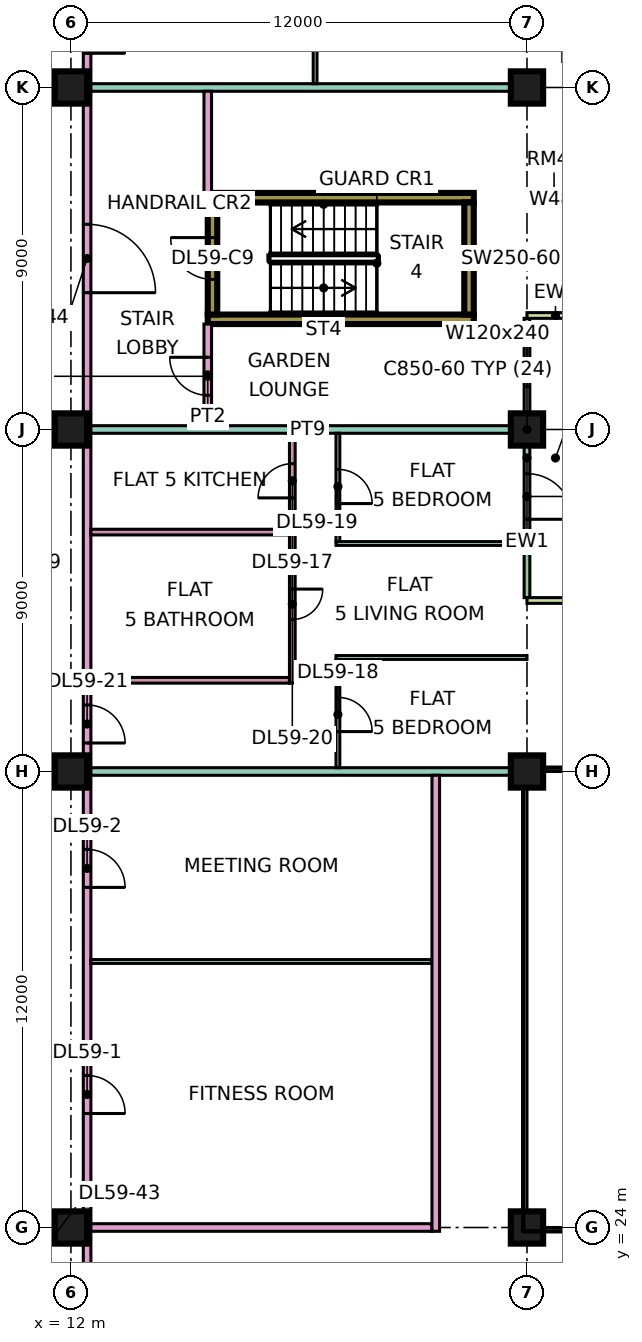
"""IFC4 building model, lengths in metres.
Left out: names, types, materials, properties, quantities, classifications, styles, units other than length and angle.
Written with IfcOpenShell. Run it as: python <this file> out.ifc"""

import sys

from ifc_helpers import new_model, si_unit, direction, frame, frame_2d, origin, origin_2d, place, context, subcontext, project, spatial, rectangle, extrude, element, fill, save


model = new_model("IFC4")
c1 = context("Model", 3, precision=1e-05, world=origin(), true_north=direction((0.0, 1.0)))
c2 = subcontext(c1, "Body", "Model", "MODEL_VIEW")
j1 = project(units=[si_unit("LENGTHUNIT", "METRE"), si_unit("PLANEANGLEUNIT", "RADIAN")], contexts=[c1])
p1 = place(None, origin())
s1 = spatial("IfcSite", under=j1, at=p1, CompositionType="ELEMENT")
p2 = place(p1, origin())
s2 = spatial("IfcBuilding", under=s1, at=p2, CompositionType="ELEMENT")
p3 = place(p2, frame((0.0, 0.0, 249.15)))
s3 = spatial("IfcBuildingStorey", under=s2, at=p3, CompositionType="ELEMENT", Elevation=249.15)
for number, where, z_axis, x_axis in (
    (1, (12.0, 24.0, 0.0), (0.0, 0.0, 1.0), (1.0, 0.0, 0.0)),
    (2, (12.0, 36.0, 0.0), (0.0, 0.0, 1.0), (1.0, 0.0, 0.0)),
    (3, (12.0, 45.0, 0.0), (0.0, 0.0, 1.0), (1.0, 0.0, 0.0)),
    (4, (12.0, 54.0, 0.0), (0.0, 0.0, 1.0), (1.0, 0.0, 0.0)),
    (5, (24.0, 24.0, 0.0), (0.0, 0.0, 1.0), (1.0, 0.0, 0.0)),
    (6, (24.0, 36.0, 0.0), (0.0, 0.0, 1.0), (1.0, 0.0, 0.0)),
    (7, (24.0, 45.0, 0.0), (0.0, 0.0, 1.0), (1.0, 0.0, 0.0)),
    (8, (24.0, 54.0, 0.0), (0.0, 0.0, 1.0), (1.0, 0.0, 0.0)),
):
    element("IfcColumn", number, at=place(p3, frame(where, z_axis=z_axis, x_axis=x_axis)), inside=s3, PredefinedType="COLUMN", context=c2, shape_type="SweptSolid", body=[
        extrude(rectangle(XDim=0.85, YDim=0.85, at=origin_2d()), origin(), (0.0, 0.0, 1.0), 3.75),
    ])
for number, where, z_axis, x_axis in (
    (9, (15.6, 47.9, 0.0), (0.0, 0.0, 1.0), (1.0, 0.0, 0.0)),
    (10, (15.6, 51.1, 0.0), (0.0, 0.0, 1.0), (1.0, 0.0, 0.0)),
):
    element("IfcWall", number, at=place(p3, frame(where, z_axis=z_axis, x_axis=x_axis)), inside=s3, PredefinedType="SHEAR", context=c2, shape_type="SweptSolid", body=[
        extrude(rectangle(XDim=7.0, YDim=0.25, at=frame_2d((3.5, 0.0))), origin(), (0.0, 0.0, 1.0), 3.75),
    ])
p4 = place(p3, frame((15.725, 48.025, 0.0), z_axis=(0.0, 0.0, 1.0), x_axis=(0.0, 1.0, 0.0)))
e11 = element("IfcWall", 11, at=p4, inside=s3, PredefinedType="SHEAR", context=c2, shape_type="SweptSolid", body=[
    extrude(rectangle(XDim=2.95, YDim=0.25, at=frame_2d((1.475, 0.0))), origin(), (0.0, 0.0, 1.0), 3.75),
])
p5 = place(p4, frame((0.925, 0.0, 0.0)))
e12 = element("IfcOpeningElement", 12, at=p5, cuts=e11, PredefinedType="OPENING", context=c2, shape_type="SweptSolid", body=[
    extrude(rectangle(XDim=1.1, YDim=2.2, at=frame_2d((0.55, 1.1))), frame((0.0, 0.135, 0.0), z_axis=(0.0, -1.0, 0.0), x_axis=(1.0, 0.0, 0.0)), (0.0, 0.0, 1.0), 0.27),
])
p6 = place(p3, frame((22.475, 48.025, 0.0), z_axis=(0.0, 0.0, 1.0), x_axis=(0.0, 1.0, 0.0)))
e13 = element("IfcWall", 13, at=p6, inside=s3, PredefinedType="SHEAR", context=c2, shape_type="SweptSolid", body=[
    extrude(rectangle(XDim=2.95, YDim=0.25, at=frame_2d((1.475, 0.0))), origin(), (0.0, 0.0, 1.0), 3.75),
])
p7 = place(p3, frame((24.0, 40.575, 0.0), z_axis=(0.0, 0.0, 1.0), x_axis=(0.0, 1.0, 0.0)))
e14 = element("IfcWall", 14, at=p7, inside=s3, PredefinedType="SOLIDWALL", context=c2, shape_type="SweptSolid", body=[
    extrude(rectangle(XDim=7.35, YDim=0.15, at=frame_2d((3.675, 0.0))), origin(), (0.0, 0.0, 1.0), 3.35),
])
p8 = place(p7, frame((2.062, 0.0, 0.0)))
e15 = element("IfcOpeningElement", 15, at=p8, cuts=e14, PredefinedType="OPENING", context=c2, shape_type="SweptSolid", body=[
    extrude(rectangle(XDim=1.2, YDim=2.4, at=frame_2d((0.6, 1.2))), frame((0.0, 0.085, 0.0), z_axis=(0.0, -1.0, 0.0), x_axis=(1.0, 0.0, 0.0)), (0.0, 0.0, 1.0), 0.17),
])
p9 = place(p7, frame((5.55, 0.0, 0.45)))
e16 = element("IfcOpeningElement", 16, at=p9, cuts=e14, PredefinedType="OPENING", context=c2, shape_type="SweptSolid", body=[
    extrude(rectangle(XDim=1.2, YDim=2.4, at=frame_2d((0.6, 1.2))), frame((0.0, 0.085, 0.0), z_axis=(0.0, -1.0, 0.0), x_axis=(1.0, 0.0, 0.0)), (0.0, 0.0, 1.0), 0.17),
])
for number, where, z_axis, x_axis in (
    (17, (25.5, 40.5, 0.0), (0.0, 0.0, 1.0), (-1.0, 0.0, 0.0)),
    (18, (25.5, 48.0, 0.0), (0.0, 0.0, 1.0), (-1.0, 0.0, 0.0)),
):
    element("IfcWall", number, at=place(p3, frame(where, z_axis=z_axis, x_axis=x_axis)), inside=s3, PredefinedType="SOLIDWALL", context=c2, shape_type="SweptSolid", body=[
        extrude(rectangle(XDim=1.5, YDim=0.15, at=frame_2d((0.75, 0.0))), origin(), (0.0, 0.0, 1.0), 3.35),
    ])
p10 = place(p3, frame((12.425, 20.0, 0.0), z_axis=(0.0, 0.0, 1.0), x_axis=(0.0, 1.0, 0.0)))
e19 = element("IfcWall", 19, at=p10, inside=s3, PredefinedType="PARTITIONING", context=c2, shape_type="SweptSolid", body=[
    extrude(rectangle(XDim=42.926, YDim=0.2, at=frame_2d((21.463, 0.0))), origin(), (0.0, 0.0, 1.0), 3.35),
])
p11 = place(p10, frame((7.0, 0.0, 0.0)))
e20 = element("IfcOpeningElement", 20, at=p11, cuts=e19, PredefinedType="OPENING", context=c2, shape_type="SweptSolid", body=[
    extrude(rectangle(XDim=1.0, YDim=2.1, at=frame_2d((0.5, 1.05))), frame((0.0, 0.11, 0.0), z_axis=(0.0, -1.0, 0.0), x_axis=(1.0, 0.0, 0.0)), (0.0, 0.0, 1.0), 0.22),
])
p12 = place(p10, frame((12.95, 0.0, 0.0)))
e21 = element("IfcOpeningElement", 21, at=p12, cuts=e19, PredefinedType="OPENING", context=c2, shape_type="SweptSolid", body=[
    extrude(rectangle(XDim=1.0, YDim=2.1, at=frame_2d((0.5, 1.05))), frame((0.0, 0.11, 0.0), z_axis=(0.0, -1.0, 0.0), x_axis=(1.0, 0.0, 0.0)), (0.0, 0.0, 1.0), 0.22),
])
p13 = place(p10, frame((16.75, 0.0, 0.0)))
e22 = element("IfcOpeningElement", 22, at=p13, cuts=e19, PredefinedType="OPENING", context=c2, shape_type="SweptSolid", body=[
    extrude(rectangle(XDim=1.0, YDim=2.1, at=frame_2d((0.5, 1.05))), frame((0.0, 0.11, 0.0), z_axis=(0.0, -1.0, 0.0), x_axis=(1.0, 0.0, 0.0)), (0.0, 0.0, 1.0), 0.22),
])
p14 = place(p10, frame((34.9, 0.0, 0.0)))
e23 = element("IfcOpeningElement", 23, at=p14, cuts=e19, PredefinedType="OPENING", context=c2, shape_type="SweptSolid", body=[
    extrude(rectangle(XDim=1.0, YDim=2.1, at=frame_2d((0.5, 1.05))), frame((0.0, 0.11, 0.0), z_axis=(0.0, -1.0, 0.0), x_axis=(1.0, 0.0, 0.0)), (0.0, 0.0, 1.0), 0.22),
])
p15 = place(p10, frame((1.15, 0.0, 0.0)))
e24 = element("IfcOpeningElement", 24, at=p15, cuts=e19, PredefinedType="OPENING", context=c2, shape_type="SweptSolid", body=[
    extrude(rectangle(XDim=1.8, YDim=2.1, at=frame_2d((0.9, 1.05))), frame((0.0, 0.11, 0.0), z_axis=(0.0, -1.0, 0.0), x_axis=(1.0, 0.0, 0.0)), (0.0, 0.0, 1.0), 0.22),
])
p16 = place(p10, frame((28.6, 0.0, 0.0)))
e25 = element("IfcOpeningElement", 25, at=p16, cuts=e19, PredefinedType="OPENING", context=c2, shape_type="SweptSolid", body=[
    extrude(rectangle(XDim=1.8, YDim=2.1, at=frame_2d((0.9, 1.05))), frame((0.0, 0.11, 0.0), z_axis=(0.0, -1.0, 0.0), x_axis=(1.0, 0.0, 0.0)), (0.0, 0.0, 1.0), 0.22),
])
p17 = place(p3, frame((12.525, 24.0, 0.0), z_axis=(0.0, 0.0, 1.0), x_axis=(1.0, 0.0, 0.0)))
e26 = element("IfcWall", 26, at=p17, inside=s3, PredefinedType="PARTITIONING", context=c2, shape_type="SweptSolid", body=[
    extrude(rectangle(XDim=8.975, YDim=0.2, at=frame_2d((4.488, 0.0))), origin(), (0.0, 0.0, 1.0), 3.35),
])
p18 = place(p3, frame((12.525, 31.0, 0.0), z_axis=(0.0, 0.0, 1.0), x_axis=(1.0, 0.0, 0.0)))
e27 = element("IfcWall", 27, at=p18, inside=s3, PredefinedType="PARTITIONING", context=c2, shape_type="SweptSolid", body=[
    extrude(rectangle(XDim=8.975, YDim=0.1, at=frame_2d((4.488, 0.0))), origin(), (0.0, 0.0, 1.0), 3.35),
])
p19 = place(p3, frame((12.525, 36.0, 0.0), z_axis=(0.0, 0.0, 1.0), x_axis=(1.0, 0.0, 0.0)))
e28 = element("IfcWall", 28, at=p19, inside=s3, PredefinedType="PARTITIONING", context=c2, shape_type="SweptSolid", body=[
    extrude(rectangle(XDim=11.475, YDim=0.2, at=frame_2d((5.738, 0.0))), origin(), (0.0, 0.0, 1.0), 3.35),
])
for number, where, z_axis, x_axis in (
    (29, (12.525, 38.4, 0.0), (0.0, 0.0, 1.0), (1.0, 0.0, 0.0)),
    (30, (12.525, 42.3, 0.0), (0.0, 0.0, 1.0), (1.0, 0.0, 0.0)),
):
    element("IfcWall", number, at=place(p3, frame(where, z_axis=z_axis, x_axis=x_axis)), inside=s3, PredefinedType="PARTITIONING", context=c2, shape_type="SweptSolid", body=[
        extrude(rectangle(XDim=5.225, YDim=0.15, at=frame_2d((2.613, 0.0))), origin(), (0.0, 0.0, 1.0), 3.35),
    ])
p20 = place(p3, frame((12.525, 45.0, 0.0), z_axis=(0.0, 0.0, 1.0), x_axis=(1.0, 0.0, 0.0)))
e31 = element("IfcWall", 31, at=p20, inside=s3, PredefinedType="PARTITIONING", context=c2, shape_type="SweptSolid", body=[
    extrude(rectangle(XDim=11.401, YDim=0.2, at=frame_2d((5.701, 0.0))), origin(), (0.0, 0.0, 1.0), 3.35),
])
p21 = place(p3, frame((12.525, 54.0, 0.0), z_axis=(0.0, 0.0, 1.0), x_axis=(1.0, 0.0, 0.0)))
e32 = element("IfcWall", 32, at=p21, inside=s3, PredefinedType="PARTITIONING", context=c2, shape_type="SweptSolid", body=[
    extrude(rectangle(XDim=11.475, YDim=0.2, at=frame_2d((5.738, 0.0))), origin(), (0.0, 0.0, 1.0), 3.35),
])
p22 = place(p3, frame((15.6, 45.1, 0.0), z_axis=(0.0, 0.0, 1.0), x_axis=(0.0, 1.0, 0.0)))
e33 = element("IfcWall", 33, at=p22, inside=s3, PredefinedType="PARTITIONING", context=c2, shape_type="SweptSolid", body=[
    extrude(rectangle(XDim=2.675, YDim=0.2, at=frame_2d((1.337, 0.0))), origin(), (0.0, 0.0, 1.0), 3.35),
])
p23 = place(p22, frame((0.8, 0.0, 0.0)))
e34 = element("IfcOpeningElement", 34, at=p23, cuts=e33, PredefinedType="OPENING", context=c2, shape_type="SweptSolid", body=[
    extrude(rectangle(XDim=1.0, YDim=2.1, at=frame_2d((0.5, 1.05))), frame((0.0, 0.11, 0.0), z_axis=(0.0, -1.0, 0.0), x_axis=(1.0, 0.0, 0.0)), (0.0, 0.0, 1.0), 0.22),
])
p24 = place(p3, frame((15.6, 51.225, 0.0), z_axis=(0.0, 0.0, 1.0), x_axis=(0.0, 1.0, 0.0)))
e35 = element("IfcWall", 35, at=p24, inside=s3, PredefinedType="PARTITIONING", context=c2, shape_type="SweptSolid", body=[
    extrude(rectangle(XDim=2.675, YDim=0.2, at=frame_2d((1.337, 0.0))), origin(), (0.0, 0.0, 1.0), 3.35),
])
p25 = place(p3, frame((17.825, 38.325, 0.0), z_axis=(0.0, 0.0, 1.0), x_axis=(0.0, 1.0, 0.0)))
e36 = element("IfcWall", 36, at=p25, inside=s3, PredefinedType="PARTITIONING", context=c2, shape_type="SweptSolid", body=[
    extrude(rectangle(XDim=6.575, YDim=0.15, at=frame_2d((3.288, 0.0))), origin(), (0.0, 0.0, 1.0), 3.35),
])
p26 = place(p25, frame((1.675, 0.0, 0.0)))
e37 = element("IfcOpeningElement", 37, at=p26, cuts=e36, PredefinedType="OPENING", context=c2, shape_type="SweptSolid", body=[
    extrude(rectangle(XDim=0.8, YDim=2.1, at=frame_2d((0.4, 1.05))), frame((0.0, 0.085, 0.0), z_axis=(0.0, -1.0, 0.0), x_axis=(1.0, 0.0, 0.0)), (0.0, 0.0, 1.0), 0.17),
])
p27 = place(p25, frame((4.875, 0.0, 0.0)))
e38 = element("IfcOpeningElement", 38, at=p27, cuts=e36, PredefinedType="OPENING", context=c2, shape_type="SweptSolid", body=[
    extrude(rectangle(XDim=0.9, YDim=2.1, at=frame_2d((0.45, 1.05))), frame((0.0, 0.085, 0.0), z_axis=(0.0, -1.0, 0.0), x_axis=(1.0, 0.0, 0.0)), (0.0, 0.0, 1.0), 0.17),
])
p28 = place(p3, frame((18.425, 54.1, 0.0), z_axis=(0.0, 0.0, 1.0), x_axis=(0.0, 1.0, 0.0)))
e39 = element("IfcWall", 39, at=p28, inside=s3, PredefinedType="PARTITIONING", context=c2, shape_type="SweptSolid", body=[
    extrude(rectangle(XDim=2.85, YDim=0.1, at=frame_2d((1.425, 0.0))), origin(), (0.0, 0.0, 1.0), 3.35),
])
p29 = place(p28, frame((0.95, 0.0, 0.0)))
e40 = element("IfcOpeningElement", 40, at=p29, cuts=e39, PredefinedType="OPENING", context=c2, shape_type="SweptSolid", body=[
    extrude(rectangle(XDim=0.9, YDim=2.1, at=frame_2d((0.45, 1.05))), frame((0.0, 0.06, 0.0), z_axis=(0.0, -1.0, 0.0), x_axis=(1.0, 0.0, 0.0)), (0.0, 0.0, 1.0), 0.12),
])
p30 = place(p3, frame((18.975, 39.0, 0.0), z_axis=(0.0, 0.0, 1.0), x_axis=(1.0, 0.0, 0.0)))
e41 = element("IfcWall", 41, at=p30, inside=s3, PredefinedType="PARTITIONING", context=c2, shape_type="SweptSolid", body=[
    extrude(rectangle(XDim=5.025, YDim=0.1, at=frame_2d((2.512, 0.0))), origin(), (0.0, 0.0, 1.0), 3.35),
])
p31 = place(p3, frame((18.975, 42.0, 0.0), z_axis=(0.0, 0.0, 1.0), x_axis=(1.0, 0.0, 0.0)))
e42 = element("IfcWall", 42, at=p31, inside=s3, PredefinedType="PARTITIONING", context=c2, shape_type="SweptSolid", body=[
    extrude(rectangle(XDim=4.951, YDim=0.1, at=frame_2d((2.476, 0.0))), origin(), (0.0, 0.0, 1.0), 3.35),
])
p32 = place(p3, frame((19.025, 36.1, 0.0), z_axis=(0.0, 0.0, 1.0), x_axis=(0.0, 1.0, 0.0)))
e43 = element("IfcWall", 43, at=p32, inside=s3, PredefinedType="PARTITIONING", context=c2, shape_type="SweptSolid", body=[
    extrude(rectangle(XDim=2.85, YDim=0.1, at=frame_2d((1.425, 0.0))), origin(), (0.0, 0.0, 1.0), 3.35),
])
p33 = place(p32, frame((0.95, 0.0, 0.0)))
e44 = element("IfcOpeningElement", 44, at=p33, cuts=e43, PredefinedType="OPENING", context=c2, shape_type="SweptSolid", body=[
    extrude(rectangle(XDim=0.9, YDim=2.1, at=frame_2d((0.45, 1.05))), frame((0.0, 0.06, 0.0), z_axis=(0.0, -1.0, 0.0), x_axis=(1.0, 0.0, 0.0)), (0.0, 0.0, 1.0), 0.12),
])
p34 = place(p3, frame((19.025, 42.05, 0.0), z_axis=(0.0, 0.0, 1.0), x_axis=(0.0, 1.0, 0.0)))
e45 = element("IfcWall", 45, at=p34, inside=s3, PredefinedType="PARTITIONING", context=c2, shape_type="SweptSolid", body=[
    extrude(rectangle(XDim=2.85, YDim=0.1, at=frame_2d((1.425, 0.0))), origin(), (0.0, 0.0, 1.0), 3.35),
])
p35 = place(p34, frame((1.0, 0.0, 0.0)))
e46 = element("IfcOpeningElement", 46, at=p35, cuts=e45, PredefinedType="OPENING", context=c2, shape_type="SweptSolid", body=[
    extrude(rectangle(XDim=0.9, YDim=2.1, at=frame_2d((0.45, 1.05))), frame((0.0, 0.06, 0.0), z_axis=(0.0, -1.0, 0.0), x_axis=(1.0, 0.0, 0.0)), (0.0, 0.0, 1.0), 0.12),
])
p36 = place(p3, frame((21.6, 23.9, 0.0), z_axis=(0.0, 0.0, 1.0), x_axis=(0.0, 1.0, 0.0)))
e47 = element("IfcWall", 47, at=p36, inside=s3, PredefinedType="PARTITIONING", context=c2, shape_type="SweptSolid", body=[
    extrude(rectangle(XDim=12.0, YDim=0.2, at=frame_2d((6.0, 0.0))), origin(), (0.0, 0.0, 1.0), 3.35),
])
p37 = place(p8, frame((1.2, 0.0, 0.0), z_axis=(0.0, 0.0, 1.0), x_axis=(-1.0, 0.0, 0.0)))
e48 = element("IfcDoor", 48, at=p37, inside=s3, OperationType="DOUBLE_DOOR_SINGLE_SWING", PredefinedType="DOOR", context=c2, shape_type="SweptSolid", body=[
    extrude(rectangle(XDim=1.2, YDim=2.4, at=frame_2d((0.6, 1.2))), frame((0.0, 0.025, 0.0), z_axis=(0.0, -1.0, 0.0), x_axis=(1.0, 0.0, 0.0)), (0.0, 0.0, 1.0), 0.05),
])
fill(e15, e48)
p38 = place(p9, origin())
e49 = element("IfcWindow", 49, at=p38, inside=s3, PartitioningType="SINGLE_PANEL", PredefinedType="WINDOW", context=c2, shape_type="SweptSolid", body=[
    extrude(rectangle(XDim=1.2, YDim=2.4, at=frame_2d((0.6, 1.2))), frame((0.0, 0.03, 0.0), z_axis=(0.0, -1.0, 0.0), x_axis=(1.0, 0.0, 0.0)), (0.0, 0.0, 1.0), 0.06),
])
fill(e16, e49)
p39 = place(p5, frame((1.1, 0.0, 0.0), z_axis=(0.0, 0.0, 1.0), x_axis=(-1.0, 0.0, 0.0)))
e50 = element("IfcDoor", 50, at=p39, inside=s3, OperationType="SINGLE_SWING_RIGHT", PredefinedType="DOOR", context=c2, shape_type="SweptSolid", body=[
    extrude(rectangle(XDim=1.1, YDim=2.2, at=frame_2d((0.55, 1.1))), frame((0.0, 0.025, 0.0), z_axis=(0.0, -1.0, 0.0), x_axis=(1.0, 0.0, 0.0)), (0.0, 0.0, 1.0), 0.05),
])
fill(e12, e50)
p40 = place(p11, frame((1.0, 0.0, 0.0), z_axis=(0.0, 0.0, 1.0), x_axis=(-1.0, 0.0, 0.0)))
e51 = element("IfcDoor", 51, at=p40, inside=s3, OperationType="SINGLE_SWING_LEFT", PredefinedType="DOOR", context=c2, shape_type="SweptSolid", body=[
    extrude(rectangle(XDim=1.0, YDim=2.1, at=frame_2d((0.5, 1.05))), frame((0.0, 0.025, 0.0), z_axis=(0.0, -1.0, 0.0), x_axis=(1.0, 0.0, 0.0)), (0.0, 0.0, 1.0), 0.05),
])
fill(e20, e51)
p41 = place(p12, frame((1.0, 0.0, 0.0), z_axis=(0.0, 0.0, 1.0), x_axis=(-1.0, 0.0, 0.0)))
e52 = element("IfcDoor", 52, at=p41, inside=s3, OperationType="SINGLE_SWING_LEFT", PredefinedType="DOOR", context=c2, shape_type="SweptSolid", body=[
    extrude(rectangle(XDim=1.0, YDim=2.1, at=frame_2d((0.5, 1.05))), frame((0.0, 0.025, 0.0), z_axis=(0.0, -1.0, 0.0), x_axis=(1.0, 0.0, 0.0)), (0.0, 0.0, 1.0), 0.05),
])
fill(e21, e52)
p42 = place(p26, origin())
e53 = element("IfcDoor", 53, at=p42, inside=s3, OperationType="SINGLE_SWING_RIGHT", PredefinedType="DOOR", context=c2, shape_type="SweptSolid", body=[
    extrude(rectangle(XDim=0.8, YDim=2.1, at=frame_2d((0.4, 1.05))), frame((0.0, 0.025, 0.0), z_axis=(0.0, -1.0, 0.0), x_axis=(1.0, 0.0, 0.0)), (0.0, 0.0, 1.0), 0.05),
])
fill(e37, e53)
p43 = place(p33, frame((0.9, 0.0, 0.0), z_axis=(0.0, 0.0, 1.0), x_axis=(-1.0, 0.0, 0.0)))
e54 = element("IfcDoor", 54, at=p43, inside=s3, OperationType="SINGLE_SWING_LEFT", PredefinedType="DOOR", context=c2, shape_type="SweptSolid", body=[
    extrude(rectangle(XDim=0.9, YDim=2.1, at=frame_2d((0.45, 1.05))), frame((0.0, 0.025, 0.0), z_axis=(0.0, -1.0, 0.0), x_axis=(1.0, 0.0, 0.0)), (0.0, 0.0, 1.0), 0.05),
])
fill(e44, e54)
p44 = place(p35, frame((0.9, 0.0, 0.0), z_axis=(0.0, 0.0, 1.0), x_axis=(-1.0, 0.0, 0.0)))
e55 = element("IfcDoor", 55, at=p44, inside=s3, OperationType="SINGLE_SWING_LEFT", PredefinedType="DOOR", context=c2, shape_type="SweptSolid", body=[
    extrude(rectangle(XDim=0.9, YDim=2.1, at=frame_2d((0.45, 1.05))), frame((0.0, 0.025, 0.0), z_axis=(0.0, -1.0, 0.0), x_axis=(1.0, 0.0, 0.0)), (0.0, 0.0, 1.0), 0.05),
])
fill(e46, e55)
p45 = place(p27, origin())
e56 = element("IfcDoor", 56, at=p45, inside=s3, OperationType="SINGLE_SWING_LEFT", PredefinedType="DOOR", context=c2, shape_type="SweptSolid", body=[
    extrude(rectangle(XDim=0.9, YDim=2.1, at=frame_2d((0.45, 1.05))), frame((0.0, 0.025, 0.0), z_axis=(0.0, -1.0, 0.0), x_axis=(1.0, 0.0, 0.0)), (0.0, 0.0, 1.0), 0.05),
])
fill(e38, e56)
p46 = place(p13, frame((1.0, 0.0, 0.0), z_axis=(0.0, 0.0, 1.0), x_axis=(-1.0, 0.0, 0.0)))
e57 = element("IfcDoor", 57, at=p46, inside=s3, OperationType="SINGLE_SWING_LEFT", PredefinedType="DOOR", context=c2, shape_type="SweptSolid", body=[
    extrude(rectangle(XDim=1.0, YDim=2.1, at=frame_2d((0.5, 1.05))), frame((0.0, 0.025, 0.0), z_axis=(0.0, -1.0, 0.0), x_axis=(1.0, 0.0, 0.0)), (0.0, 0.0, 1.0), 0.05),
])
fill(e22, e57)
p47 = place(p14, frame((1.0, 0.0, 0.0), z_axis=(0.0, 0.0, 1.0), x_axis=(-1.0, 0.0, 0.0)))
e58 = element("IfcDoor", 58, at=p47, inside=s3, OperationType="SINGLE_SWING_LEFT", PredefinedType="DOOR", context=c2, shape_type="SweptSolid", body=[
    extrude(rectangle(XDim=1.0, YDim=2.1, at=frame_2d((0.5, 1.05))), frame((0.0, 0.025, 0.0), z_axis=(0.0, -1.0, 0.0), x_axis=(1.0, 0.0, 0.0)), (0.0, 0.0, 1.0), 0.05),
])
fill(e23, e58)
p48 = place(p16, frame((1.8, 0.0, 0.0), z_axis=(0.0, 0.0, 1.0), x_axis=(-1.0, 0.0, 0.0)))
e59 = element("IfcDoor", 59, at=p48, inside=s3, OperationType="DOUBLE_DOOR_SINGLE_SWING", PredefinedType="DOOR", context=c2, shape_type="SweptSolid", body=[
    extrude(rectangle(XDim=1.8, YDim=2.1, at=frame_2d((0.9, 1.05))), frame((0.0, 0.025, 0.0), z_axis=(0.0, -1.0, 0.0), x_axis=(1.0, 0.0, 0.0)), (0.0, 0.0, 1.0), 0.05),
])
fill(e25, e59)
p49 = place(p23, frame((1.0, 0.0, 0.0), z_axis=(0.0, 0.0, 1.0), x_axis=(-1.0, 0.0, 0.0)))
e60 = element("IfcDoor", 60, at=p49, inside=s3, OperationType="SINGLE_SWING_RIGHT", PredefinedType="DOOR", context=c2, shape_type="SweptSolid", body=[
    extrude(rectangle(XDim=1.0, YDim=2.1, at=frame_2d((0.5, 1.05))), frame((0.0, 0.025, 0.0), z_axis=(0.0, -1.0, 0.0), x_axis=(1.0, 0.0, 0.0)), (0.0, 0.0, 1.0), 0.05),
])
fill(e34, e60)
save(model, sys.argv[1])
